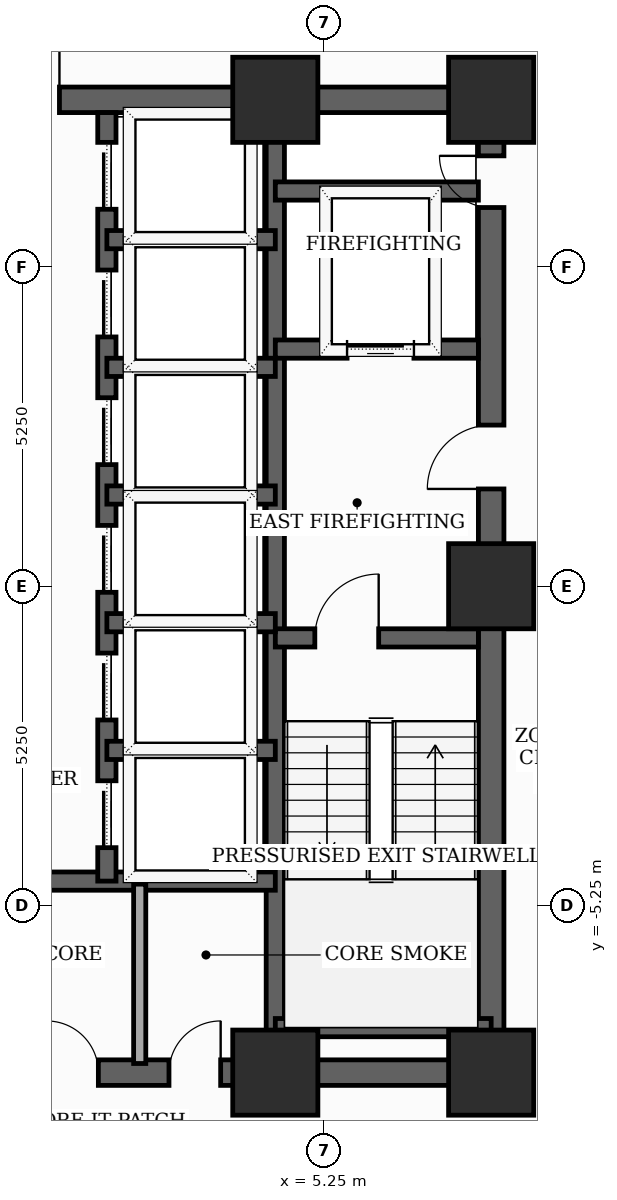
"""IFC4 building model, lengths in metres.
Left out: names, types, materials, properties, quantities, classifications, styles, units other than length and angle.
Written with IfcOpenShell. Run it as: python <this file> out.ifc"""

import sys

from ifc_helpers import new_model, si_unit, direction, frame, frame_2d, origin, origin_2d, place, context, subcontext, project, spatial, rectangle, extrude, element, fill, save


model = new_model("IFC4")
c1 = context("Model", 3, precision=1e-05, world=origin(), true_north=direction((0.0, 1.0)))
c2 = subcontext(c1, "Body", "Model", "MODEL_VIEW")
j1 = project(units=[si_unit("LENGTHUNIT", "METRE"), si_unit("PLANEANGLEUNIT", "RADIAN")], contexts=[c1])
p1 = place(None, origin())
s1 = spatial("IfcSite", under=j1, at=p1, CompositionType="ELEMENT")
p2 = place(p1, origin())
s2 = spatial("IfcBuilding", under=s1, at=p2, CompositionType="ELEMENT")
p3 = place(p2, frame((0.0, 0.0, 112.5)))
s3 = spatial("IfcBuildingStorey", under=s2, at=p3, CompositionType="ELEMENT", Elevation=112.5)
for number, where, z_axis, x_axis in (
    (1, (4.45, -8.0, 0.0), (0.0, 0.0, 1.0), (1.0, 0.0, 0.0)),
    (2, (8.0, -8.0, 0.0), (0.0, 0.0, 1.0), (1.0, 0.0, 0.0)),
    (3, (8.0, 0.0, 0.0), (0.0, 0.0, 1.0), (1.0, 0.0, 0.0)),
    (4, (8.0, 8.0, 0.0), (0.0, 0.0, 1.0), (1.0, 0.0, 0.0)),
    (5, (4.45, 8.0, 0.0), (0.0, 0.0, 1.0), (1.0, 0.0, 0.0)),
):
    element("IfcColumn", number, at=place(p3, frame(where, z_axis=z_axis, x_axis=x_axis)), inside=s3, PredefinedType="COLUMN", context=c2, shape_type="SweptSolid", body=[
        extrude(rectangle(XDim=1.4, YDim=1.4, at=origin_2d()), origin(), (0.0, 0.0, 1.0), 3.7),
    ])
p4 = place(p3, frame((8.0, -8.0, 0.0), z_axis=(0.0, 0.0, 1.0), x_axis=(0.0, 1.0, 0.0)))
e6 = element("IfcWall", 6, at=p4, inside=s3, PredefinedType="SHEAR", context=c2, shape_type="SweptSolid", body=[
    extrude(rectangle(XDim=16.0, YDim=0.42, at=frame_2d((8.0, 0.0))), origin(), (0.0, 0.0, 1.0), 3.5),
])
p5 = place(p4, frame((9.6, 0.0, 0.0)))
e7 = element("IfcOpeningElement", 7, at=p5, cuts=e6, PredefinedType="OPENING", context=c2, shape_type="SweptSolid", body=[
    extrude(rectangle(XDim=1.05, YDim=2.15, at=frame_2d((0.525, 1.075))), frame((0.0, 0.22, 0.0), z_axis=(0.0, -1.0, 0.0), x_axis=(1.0, 0.0, 0.0)), (0.0, 0.0, 1.0), 0.44),
])
p6 = place(p4, frame((14.229, 0.0, 0.0)))
e8 = element("IfcOpeningElement", 8, at=p6, cuts=e6, PredefinedType="OPENING", context=c2, shape_type="SweptSolid", body=[
    extrude(rectangle(XDim=0.85, YDim=2.02, at=frame_2d((0.425, 1.01))), frame((0.0, 0.22, 0.0), z_axis=(0.0, -1.0, 0.0), x_axis=(1.0, 0.0, 0.0)), (0.0, 0.0, 1.0), 0.44),
])
p7 = place(p3, frame((-8.0, -8.0, 0.0), z_axis=(0.0, 0.0, 1.0), x_axis=(1.0, 0.0, 0.0)))
e9 = element("IfcWall", 9, at=p7, inside=s3, PredefinedType="SHEAR", context=c2, shape_type="SweptSolid", body=[
    extrude(rectangle(XDim=16.0, YDim=0.42, at=frame_2d((8.0, 0.0))), origin(), (0.0, 0.0, 1.0), 3.5),
])
p8 = place(p7, frame((4.449, 0.0, 0.0)))
e10 = element("IfcOpeningElement", 10, at=p8, cuts=e9, PredefinedType="OPENING", context=c2, shape_type="SweptSolid", body=[
    extrude(rectangle(XDim=0.85, YDim=2.02, at=frame_2d((0.425, 1.01))), frame((0.0, 0.22, 0.0), z_axis=(0.0, -1.0, 0.0), x_axis=(1.0, 0.0, 0.0)), (0.0, 0.0, 1.0), 0.44),
])
p9 = place(p7, frame((6.49, 0.0, 0.0)))
e11 = element("IfcOpeningElement", 11, at=p9, cuts=e9, PredefinedType="OPENING", context=c2, shape_type="SweptSolid", body=[
    extrude(rectangle(XDim=0.85, YDim=2.02, at=frame_2d((0.425, 1.01))), frame((0.0, 0.22, 0.0), z_axis=(0.0, -1.0, 0.0), x_axis=(1.0, 0.0, 0.0)), (0.0, 0.0, 1.0), 0.44),
])
p10 = place(p7, frame((8.69, 0.0, 0.0)))
e12 = element("IfcOpeningElement", 12, at=p10, cuts=e9, PredefinedType="OPENING", context=c2, shape_type="SweptSolid", body=[
    extrude(rectangle(XDim=0.85, YDim=2.02, at=frame_2d((0.425, 1.01))), frame((0.0, 0.22, 0.0), z_axis=(0.0, -1.0, 0.0), x_axis=(1.0, 0.0, 0.0)), (0.0, 0.0, 1.0), 0.44),
])
p11 = place(p7, frame((10.701, 0.0, 0.0)))
e13 = element("IfcOpeningElement", 13, at=p11, cuts=e9, PredefinedType="OPENING", context=c2, shape_type="SweptSolid", body=[
    extrude(rectangle(XDim=0.85, YDim=2.02, at=frame_2d((0.425, 1.01))), frame((0.0, 0.22, 0.0), z_axis=(0.0, -1.0, 0.0), x_axis=(1.0, 0.0, 0.0)), (0.0, 0.0, 1.0), 0.44),
])
p12 = place(p3, frame((-8.0, 8.0, 0.0), z_axis=(0.0, 0.0, 1.0), x_axis=(1.0, 0.0, 0.0)))
e14 = element("IfcWall", 14, at=p12, inside=s3, PredefinedType="SHEAR", context=c2, shape_type="SweptSolid", body=[
    extrude(rectangle(XDim=16.0, YDim=0.42, at=frame_2d((8.0, 0.0))), origin(), (0.0, 0.0, 1.0), 3.5),
])
p13 = place(p12, frame((7.1, 0.0, 0.0)))
e15 = element("IfcOpeningElement", 15, at=p13, cuts=e14, PredefinedType="OPENING", context=c2, shape_type="SweptSolid", body=[
    extrude(rectangle(XDim=1.8, YDim=2.15, at=frame_2d((0.9, 1.075))), frame((0.0, 0.22, 0.0), z_axis=(0.0, -1.0, 0.0), x_axis=(1.0, 0.0, 0.0)), (0.0, 0.0, 1.0), 0.44),
])
p14 = place(p3, frame((4.45, -7.79, 0.0), z_axis=(0.0, 0.0, 1.0), x_axis=(0.0, 1.0, 0.0)))
e16 = element("IfcWall", 16, at=p14, inside=s3, PredefinedType="SHEAR", context=c2, shape_type="SweptSolid", body=[
    extrude(rectangle(XDim=15.58, YDim=0.3, at=frame_2d((7.79, 0.0))), origin(), (0.0, 0.0, 1.0), 3.5),
])
p15 = place(p3, frame((4.45, -0.85, 0.0), z_axis=(0.0, 0.0, 1.0), x_axis=(1.0, 0.0, 0.0)))
e17 = element("IfcWall", 17, at=p15, inside=s3, PredefinedType="SHEAR", context=c2, shape_type="SweptSolid", body=[
    extrude(rectangle(XDim=3.34, YDim=0.3, at=frame_2d((1.67, 0.0))), origin(), (0.0, 0.0, 1.0), 3.5),
])
p16 = place(p15, frame((0.65, 0.0, 0.0)))
e18 = element("IfcOpeningElement", 18, at=p16, cuts=e17, PredefinedType="OPENING", context=c2, shape_type="SweptSolid", body=[
    extrude(rectangle(XDim=1.05, YDim=2.15, at=frame_2d((0.525, 1.075))), frame((0.0, 0.16, 0.0), z_axis=(0.0, -1.0, 0.0), x_axis=(1.0, 0.0, 0.0)), (0.0, 0.0, 1.0), 0.32),
])
p17 = place(p3, frame((4.45, -7.26, 0.0), z_axis=(0.0, 0.0, 1.0), x_axis=(1.0, 0.0, 0.0)))
e19 = element("IfcWall", 19, at=p17, inside=s3, PredefinedType="SHEAR", context=c2, shape_type="SweptSolid", body=[
    extrude(rectangle(XDim=3.55, YDim=0.3, at=frame_2d((1.775, 0.0))), origin(), (0.0, 0.0, 1.0), 3.5),
])
p18 = place(p3, frame((4.45, 3.9, 0.0), z_axis=(0.0, 0.0, 1.0), x_axis=(1.0, 0.0, 0.0)))
e20 = element("IfcWall", 20, at=p18, inside=s3, PredefinedType="SHEAR", context=c2, shape_type="SweptSolid", body=[
    extrude(rectangle(XDim=3.34, YDim=0.3, at=frame_2d((1.67, 0.0))), origin(), (0.0, 0.0, 1.0), 3.5),
])
p19 = place(p18, frame((1.18, 0.0, 0.0)))
e21 = element("IfcOpeningElement", 21, at=p19, cuts=e20, PredefinedType="OPENING", context=c2, shape_type="SweptSolid", body=[
    extrude(rectangle(XDim=1.1, YDim=2.1, at=frame_2d((0.55, 1.05))), frame((0.0, 0.16, 0.0), z_axis=(0.0, -1.0, 0.0), x_axis=(1.0, 0.0, 0.0)), (0.0, 0.0, 1.0), 0.32),
])
p20 = place(p3, frame((4.45, 6.5, 0.0), z_axis=(0.0, 0.0, 1.0), x_axis=(1.0, 0.0, 0.0)))
e22 = element("IfcWall", 22, at=p20, inside=s3, PredefinedType="SHEAR", context=c2, shape_type="SweptSolid", body=[
    extrude(rectangle(XDim=3.34, YDim=0.3, at=frame_2d((1.67, 0.0))), origin(), (0.0, 0.0, 1.0), 3.5),
])
p21 = place(p3, frame((-4.45, -4.85, 0.0), z_axis=(0.0, 0.0, 1.0), x_axis=(1.0, 0.0, 0.0)))
e23 = element("IfcWall", 23, at=p21, inside=s3, PredefinedType="SHEAR", context=c2, shape_type="SweptSolid", body=[
    extrude(rectangle(XDim=8.9, YDim=0.3, at=frame_2d((4.45, 0.0))), origin(), (0.0, 0.0, 1.0), 3.5),
])
p22 = place(p3, frame((1.68, -4.85, 0.0), z_axis=(0.0, 0.0, 1.0), x_axis=(0.0, 1.0, 0.0)))
e24 = element("IfcWall", 24, at=p22, inside=s3, PredefinedType="SHEAR", context=c2, shape_type="SweptSolid", body=[
    extrude(rectangle(XDim=12.64, YDim=0.3, at=frame_2d((6.32, 0.0))), origin(), (0.0, 0.0, 1.0), 3.5),
])
p23 = place(p22, frame((0.55, 0.0, 0.0)))
e25 = element("IfcOpeningElement", 25, at=p23, cuts=e24, PredefinedType="OPENING", context=c2, shape_type="SweptSolid", body=[
    extrude(rectangle(XDim=1.1, YDim=2.1, at=frame_2d((0.55, 1.05))), frame((0.0, 0.16, 0.0), z_axis=(0.0, -1.0, 0.0), x_axis=(1.0, 0.0, 0.0)), (0.0, 0.0, 1.0), 0.32),
])
p24 = place(p22, frame((2.65, 0.0, 0.0)))
e26 = element("IfcOpeningElement", 26, at=p24, cuts=e24, PredefinedType="OPENING", context=c2, shape_type="SweptSolid", body=[
    extrude(rectangle(XDim=1.1, YDim=2.1, at=frame_2d((0.55, 1.05))), frame((0.0, 0.16, 0.0), z_axis=(0.0, -1.0, 0.0), x_axis=(1.0, 0.0, 0.0)), (0.0, 0.0, 1.0), 0.32),
])
p25 = place(p22, frame((4.75, 0.0, 0.0)))
e27 = element("IfcOpeningElement", 27, at=p25, cuts=e24, PredefinedType="OPENING", context=c2, shape_type="SweptSolid", body=[
    extrude(rectangle(XDim=1.1, YDim=2.1, at=frame_2d((0.55, 1.05))), frame((0.0, 0.16, 0.0), z_axis=(0.0, -1.0, 0.0), x_axis=(1.0, 0.0, 0.0)), (0.0, 0.0, 1.0), 0.32),
])
p26 = place(p22, frame((6.85, 0.0, 0.0)))
e28 = element("IfcOpeningElement", 28, at=p26, cuts=e24, PredefinedType="OPENING", context=c2, shape_type="SweptSolid", body=[
    extrude(rectangle(XDim=1.1, YDim=2.1, at=frame_2d((0.55, 1.05))), frame((0.0, 0.16, 0.0), z_axis=(0.0, -1.0, 0.0), x_axis=(1.0, 0.0, 0.0)), (0.0, 0.0, 1.0), 0.32),
])
p27 = place(p22, frame((8.95, 0.0, 0.0)))
e29 = element("IfcOpeningElement", 29, at=p27, cuts=e24, PredefinedType="OPENING", context=c2, shape_type="SweptSolid", body=[
    extrude(rectangle(XDim=1.1, YDim=2.1, at=frame_2d((0.55, 1.05))), frame((0.0, 0.16, 0.0), z_axis=(0.0, -1.0, 0.0), x_axis=(1.0, 0.0, 0.0)), (0.0, 0.0, 1.0), 0.32),
])
p28 = place(p22, frame((11.05, 0.0, 0.0)))
e30 = element("IfcOpeningElement", 30, at=p28, cuts=e24, PredefinedType="OPENING", context=c2, shape_type="SweptSolid", body=[
    extrude(rectangle(XDim=1.1, YDim=2.1, at=frame_2d((0.55, 1.05))), frame((0.0, 0.16, 0.0), z_axis=(0.0, -1.0, 0.0), x_axis=(1.0, 0.0, 0.0)), (0.0, 0.0, 1.0), 0.32),
])
for number, where, z_axis, x_axis in (
    (31, (1.68, 1.5, 0.0), (0.0, 0.0, 1.0), (1.0, 0.0, 0.0)),
    (32, (1.68, 3.6, 0.0), (0.0, 0.0, 1.0), (1.0, 0.0, 0.0)),
    (33, (1.68, 5.7, 0.0), (0.0, 0.0, 1.0), (1.0, 0.0, 0.0)),
    (34, (1.68, -2.7, 0.0), (0.0, 0.0, 1.0), (1.0, 0.0, 0.0)),
    (35, (1.68, -0.6, 0.0), (0.0, 0.0, 1.0), (1.0, 0.0, 0.0)),
):
    element("IfcWall", number, at=place(p3, frame(where, z_axis=z_axis, x_axis=x_axis)), inside=s3, PredefinedType="SHEAR", context=c2, shape_type="SweptSolid", body=[
        extrude(rectangle(XDim=2.77, YDim=0.3, at=frame_2d((1.385, 0.0))), origin(), (0.0, 0.0, 1.0), 3.5),
    ])
p29 = place(p3, frame((2.22, -7.85, 0.0), z_axis=(0.0, 0.0, 1.0), x_axis=(0.0, 1.0, 0.0)))
e36 = element("IfcWall", 36, at=p29, inside=s3, PredefinedType="SOLIDWALL", context=c2, shape_type="SweptSolid", body=[
    extrude(rectangle(XDim=2.95, YDim=0.2, at=frame_2d((1.475, 0.0))), origin(), (0.0, 0.0, 1.0), 2.885),
])
p30 = place(p5, origin())
e37 = element("IfcDoor", 37, at=p30, inside=s3, OperationType="SINGLE_SWING_LEFT", PredefinedType="DOOR", context=c2, shape_type="SweptSolid", body=[
    extrude(rectangle(XDim=1.05, YDim=2.15, at=frame_2d((0.525, 1.075))), frame((0.0, 0.025, 0.0), z_axis=(0.0, -1.0, 0.0), x_axis=(1.0, 0.0, 0.0)), (0.0, 0.0, 1.0), 0.05),
])
fill(e7, e37)
p31 = place(p6, origin())
e38 = element("IfcDoor", 38, at=p31, inside=s3, OperationType="SINGLE_SWING_RIGHT", PredefinedType="TRAPDOOR", context=c2, shape_type="SweptSolid", body=[
    extrude(rectangle(XDim=0.85, YDim=2.02, at=frame_2d((0.425, 1.01))), frame((0.0, 0.025, 0.0), z_axis=(0.0, -1.0, 0.0), x_axis=(1.0, 0.0, 0.0)), (0.0, 0.0, 1.0), 0.05),
])
fill(e8, e38)
p32 = place(p10, origin())
e39 = element("IfcDoor", 39, at=p32, inside=s3, OperationType="SINGLE_SWING_LEFT", PredefinedType="TRAPDOOR", context=c2, shape_type="SweptSolid", body=[
    extrude(rectangle(XDim=0.85, YDim=2.02, at=frame_2d((0.425, 1.01))), frame((0.0, 0.025, 0.0), z_axis=(0.0, -1.0, 0.0), x_axis=(1.0, 0.0, 0.0)), (0.0, 0.0, 1.0), 0.05),
])
fill(e12, e39)
p33 = place(p11, origin())
e40 = element("IfcDoor", 40, at=p33, inside=s3, OperationType="SINGLE_SWING_RIGHT", PredefinedType="TRAPDOOR", context=c2, shape_type="SweptSolid", body=[
    extrude(rectangle(XDim=0.85, YDim=2.02, at=frame_2d((0.425, 1.01))), frame((0.0, 0.025, 0.0), z_axis=(0.0, -1.0, 0.0), x_axis=(1.0, 0.0, 0.0)), (0.0, 0.0, 1.0), 0.05),
])
fill(e13, e40)
p34 = place(p13, origin())
e41 = element("IfcDoor", 41, at=p34, inside=s3, OperationType="DOUBLE_DOOR_SINGLE_SWING", PredefinedType="DOOR", context=c2, shape_type="SweptSolid", body=[
    extrude(rectangle(XDim=1.8, YDim=2.15, at=frame_2d((0.9, 1.075))), frame((0.0, 0.025, 0.0), z_axis=(0.0, -1.0, 0.0), x_axis=(1.0, 0.0, 0.0)), (0.0, 0.0, 1.0), 0.05),
])
fill(e15, e41)
p35 = place(p16, origin())
e42 = element("IfcDoor", 42, at=p35, inside=s3, OperationType="SINGLE_SWING_RIGHT", PredefinedType="DOOR", context=c2, shape_type="SweptSolid", body=[
    extrude(rectangle(XDim=1.05, YDim=2.15, at=frame_2d((0.525, 1.075))), frame((0.0, 0.025, 0.0), z_axis=(0.0, -1.0, 0.0), x_axis=(1.0, 0.0, 0.0)), (0.0, 0.0, 1.0), 0.05),
])
fill(e18, e42)
p36 = place(p19, origin())
e43 = element("IfcDoor", 43, at=p36, inside=s3, OperationType="SLIDING_TO_LEFT", PredefinedType="DOOR", context=c2, shape_type="SweptSolid", body=[
    extrude(rectangle(XDim=1.1, YDim=2.1, at=frame_2d((0.55, 1.05))), frame((0.0, 0.025, 0.0), z_axis=(0.0, -1.0, 0.0), x_axis=(1.0, 0.0, 0.0)), (0.0, 0.0, 1.0), 0.05),
])
fill(e21, e43)
p37 = place(p23, origin())
e44 = element("IfcDoor", 44, at=p37, inside=s3, OperationType="SLIDING_TO_LEFT", PredefinedType="DOOR", context=c2, shape_type="SweptSolid", body=[
    extrude(rectangle(XDim=1.1, YDim=2.1, at=frame_2d((0.55, 1.05))), frame((0.0, 0.025, 0.0), z_axis=(0.0, -1.0, 0.0), x_axis=(1.0, 0.0, 0.0)), (0.0, 0.0, 1.0), 0.05),
])
fill(e25, e44)
p38 = place(p24, origin())
e45 = element("IfcDoor", 45, at=p38, inside=s3, OperationType="SLIDING_TO_LEFT", PredefinedType="DOOR", context=c2, shape_type="SweptSolid", body=[
    extrude(rectangle(XDim=1.1, YDim=2.1, at=frame_2d((0.55, 1.05))), frame((0.0, 0.025, 0.0), z_axis=(0.0, -1.0, 0.0), x_axis=(1.0, 0.0, 0.0)), (0.0, 0.0, 1.0), 0.05),
])
fill(e26, e45)
p39 = place(p25, origin())
e46 = element("IfcDoor", 46, at=p39, inside=s3, OperationType="SLIDING_TO_LEFT", PredefinedType="DOOR", context=c2, shape_type="SweptSolid", body=[
    extrude(rectangle(XDim=1.1, YDim=2.1, at=frame_2d((0.55, 1.05))), frame((0.0, 0.025, 0.0), z_axis=(0.0, -1.0, 0.0), x_axis=(1.0, 0.0, 0.0)), (0.0, 0.0, 1.0), 0.05),
])
fill(e27, e46)
p40 = place(p26, origin())
e47 = element("IfcDoor", 47, at=p40, inside=s3, OperationType="SLIDING_TO_LEFT", PredefinedType="DOOR", context=c2, shape_type="SweptSolid", body=[
    extrude(rectangle(XDim=1.1, YDim=2.1, at=frame_2d((0.55, 1.05))), frame((0.0, 0.025, 0.0), z_axis=(0.0, -1.0, 0.0), x_axis=(1.0, 0.0, 0.0)), (0.0, 0.0, 1.0), 0.05),
])
fill(e28, e47)
p41 = place(p27, origin())
e48 = element("IfcDoor", 48, at=p41, inside=s3, OperationType="SLIDING_TO_LEFT", PredefinedType="DOOR", context=c2, shape_type="SweptSolid", body=[
    extrude(rectangle(XDim=1.1, YDim=2.1, at=frame_2d((0.55, 1.05))), frame((0.0, 0.025, 0.0), z_axis=(0.0, -1.0, 0.0), x_axis=(1.0, 0.0, 0.0)), (0.0, 0.0, 1.0), 0.05),
])
fill(e29, e48)
p42 = place(p28, origin())
e49 = element("IfcDoor", 49, at=p42, inside=s3, OperationType="SLIDING_TO_LEFT", PredefinedType="DOOR", context=c2, shape_type="SweptSolid", body=[
    extrude(rectangle(XDim=1.1, YDim=2.1, at=frame_2d((0.55, 1.05))), frame((0.0, 0.025, 0.0), z_axis=(0.0, -1.0, 0.0), x_axis=(1.0, 0.0, 0.0)), (0.0, 0.0, 1.0), 0.05),
])
fill(e30, e49)
save(model, sys.argv[1])
